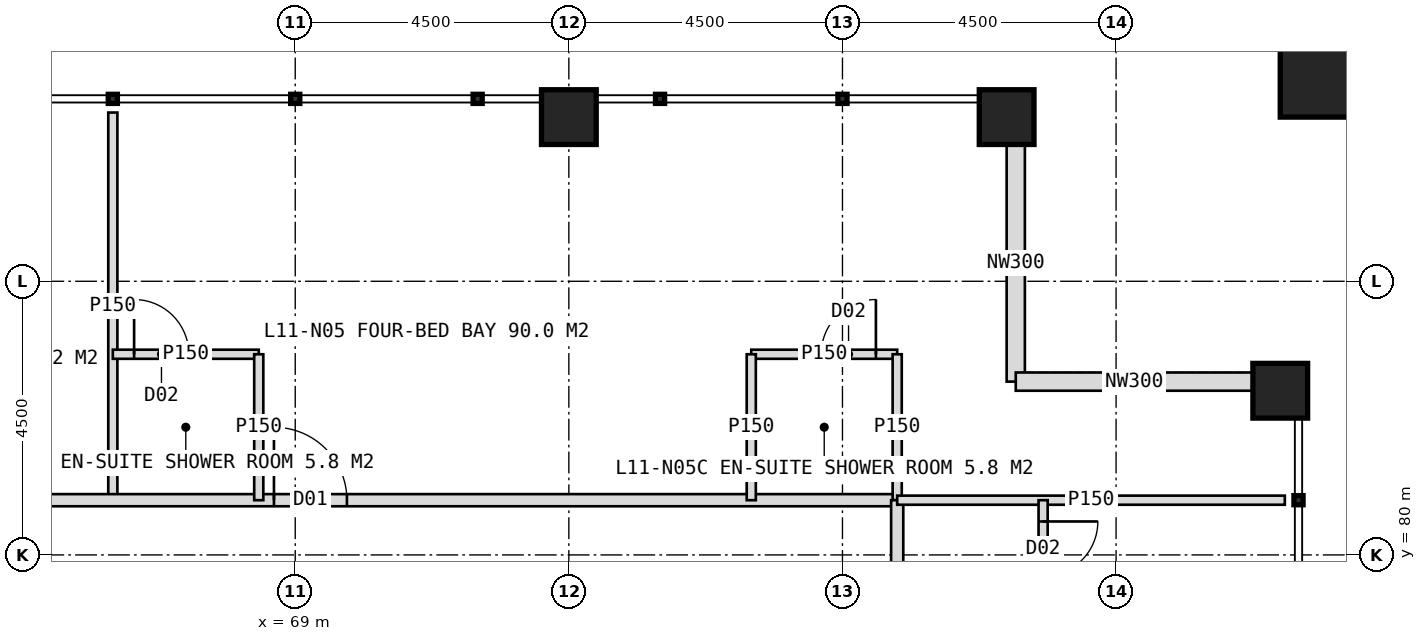
"""IFC4 building model, lengths in metres.
Left out: names, types, materials, properties, quantities, classifications, styles, units other than length and angle.
Written with IfcOpenShell. Run it as: python <this file> out.ifc"""

import sys

from ifc_helpers import new_model, si_unit, direction, frame, frame_2d, origin, origin_2d, place, context, subcontext, project, spatial, rectangle, hollow_rectangle, extrude, element, fill, save


model = new_model("IFC4")
c1 = context("Model", 3, precision=1e-05, world=origin(), true_north=direction((0.0, 1.0)))
c2 = subcontext(c1, "Body", "Model", "MODEL_VIEW")
j1 = project(units=[si_unit("LENGTHUNIT", "METRE"), si_unit("PLANEANGLEUNIT", "RADIAN")], contexts=[c1])
p1 = place(None, origin())
s1 = spatial("IfcSite", under=j1, at=p1, CompositionType="ELEMENT")
p2 = place(p1, origin())
s2 = spatial("IfcBuilding", under=s1, at=p2, CompositionType="ELEMENT")
p3 = place(p2, frame((0.0, 0.0, 51.0)))
s3 = spatial("IfcBuildingStorey", under=s2, at=p3, CompositionType="ELEMENT", Elevation=51.0)
for number, where, z_axis, x_axis in (
    (1, (73.5, 87.2, 0.0), (0.0, 0.0, 1.0), (1.0, 0.0, 0.0)),
    (2, (80.7, 87.2, 0.0), (0.0, 0.0, 1.0), (1.0, 0.0, 0.0)),
    (3, (85.2, 82.7, 0.0), (0.0, 0.0, 1.0), (1.0, 0.0, 0.0)),
):
    element("IfcColumn", number, at=place(p3, frame(where, z_axis=z_axis, x_axis=x_axis)), inside=s3, PredefinedType="COLUMN", context=c2, shape_type="SweptSolid", body=[
        extrude(hollow_rectangle(XDim=0.9, YDim=0.9, WallThickness=0.08, at=origin_2d()), origin(), (0.0, 0.0, 1.0), 4.0),
    ])
p4 = place(p3, frame((86.1, 88.1, 0.0), z_axis=(0.0, 0.0, 1.0), x_axis=(1.0, 0.0, 0.0)))
e4 = element("IfcColumn", 4, at=p4, inside=s3, PredefinedType="COLUMN", context=c2, shape_type="SweptSolid", body=[
    extrude(hollow_rectangle(XDim=1.8, YDim=1.8, WallThickness=0.1, at=origin_2d()), origin(), (0.0, 0.0, 1.0), 4.0),
])
for number, where, z_axis, x_axis in (
    (5, (80.85, 86.75, 0.0), (0.0, 0.0, 1.0), (0.0, -1.0, 0.0)),
    (6, (80.85, 82.85, 0.0), (0.0, 0.0, 1.0), (1.0, 0.0, 0.0)),
):
    element("IfcWall", number, at=place(p3, frame(where, z_axis=z_axis, x_axis=x_axis)), inside=s3, PredefinedType="ELEMENTEDWALL", context=c2, shape_type="SweptSolid", body=[
        extrude(rectangle(XDim=3.9, YDim=0.3, at=frame_2d((1.95, 0.0))), origin(), (0.0, 0.0, 1.0), 2.95),
    ])
p5 = place(p3, frame((66.0, 80.9, 0.0), z_axis=(0.0, 0.0, 1.0), x_axis=(0.0, 1.0, 0.0)))
e7 = element("IfcWall", 7, at=p5, inside=s3, PredefinedType="PARTITIONING", context=c2, shape_type="SweptSolid", body=[
    extrude(rectangle(XDim=6.375, YDim=0.15, at=frame_2d((3.188, 0.0))), origin(), (0.0, 0.0, 1.0), 3.75),
])
p6 = place(p3, frame((41.1, 80.9, 0.0), z_axis=(0.0, 0.0, 1.0), x_axis=(1.0, 0.0, 0.0)))
e8 = element("IfcWall", 8, at=p6, inside=s3, PredefinedType="PARTITIONING", context=c2, shape_type="SweptSolid", body=[
    extrude(rectangle(XDim=37.8, YDim=0.2, at=frame_2d((18.9, 0.0))), origin(), (0.0, 0.0, 1.0), 3.75),
])
p7 = place(p6, frame((3.25, 0.0, 0.0)))
e9 = element("IfcOpeningElement", 9, at=p7, cuts=e8, PredefinedType="OPENING", context=c2, shape_type="SweptSolid", body=[
    extrude(rectangle(XDim=1.2, YDim=2.2, at=frame_2d((0.6, 1.1))), frame((0.0, 0.11, 0.0), z_axis=(0.0, -1.0, 0.0), x_axis=(1.0, 0.0, 0.0)), (0.0, 0.0, 1.0), 0.22),
])
p8 = place(p6, frame((9.55, 0.0, 0.0)))
e10 = element("IfcOpeningElement", 10, at=p8, cuts=e8, PredefinedType="OPENING", context=c2, shape_type="SweptSolid", body=[
    extrude(rectangle(XDim=1.2, YDim=2.2, at=frame_2d((0.6, 1.1))), frame((0.0, 0.11, 0.0), z_axis=(0.0, -1.0, 0.0), x_axis=(1.0, 0.0, 0.0)), (0.0, 0.0, 1.0), 0.22),
])
p9 = place(p6, frame((15.55, 0.0, 0.0)))
e11 = element("IfcOpeningElement", 11, at=p9, cuts=e8, PredefinedType="OPENING", context=c2, shape_type="SweptSolid", body=[
    extrude(rectangle(XDim=1.2, YDim=2.2, at=frame_2d((0.6, 1.1))), frame((0.0, 0.11, 0.0), z_axis=(0.0, -1.0, 0.0), x_axis=(1.0, 0.0, 0.0)), (0.0, 0.0, 1.0), 0.22),
])
p10 = place(p6, frame((21.4, 0.0, 0.0)))
e12 = element("IfcOpeningElement", 12, at=p10, cuts=e8, PredefinedType="OPENING", context=c2, shape_type="SweptSolid", body=[
    extrude(rectangle(XDim=1.0, YDim=2.1, at=frame_2d((0.5, 1.05))), frame((0.0, 0.11, 0.0), z_axis=(0.0, -1.0, 0.0), x_axis=(1.0, 0.0, 0.0)), (0.0, 0.0, 1.0), 0.22),
])
p11 = place(p6, frame((27.55, 0.0, 0.0)))
e13 = element("IfcOpeningElement", 13, at=p11, cuts=e8, PredefinedType="OPENING", context=c2, shape_type="SweptSolid", body=[
    extrude(rectangle(XDim=1.2, YDim=2.2, at=frame_2d((0.6, 1.1))), frame((0.0, 0.11, 0.0), z_axis=(0.0, -1.0, 0.0), x_axis=(1.0, 0.0, 0.0)), (0.0, 0.0, 1.0), 0.22),
])
p12 = place(p3, frame((66.0, 83.3, 0.0), z_axis=(0.0, 0.0, 1.0), x_axis=(1.0, 0.0, 0.0)))
e14 = element("IfcWall", 14, at=p12, inside=s3, PredefinedType="PARTITIONING", context=c2, shape_type="SweptSolid", body=[
    extrude(rectangle(XDim=2.4, YDim=0.15, at=frame_2d((1.2, 0.0))), origin(), (0.0, 0.0, 1.0), 3.75),
])
p13 = place(p12, frame((0.35, 0.0, 0.0)))
e15 = element("IfcOpeningElement", 15, at=p13, cuts=e14, PredefinedType="OPENING", context=c2, shape_type="SweptSolid", body=[
    extrude(rectangle(XDim=0.9, YDim=2.1, at=frame_2d((0.45, 1.05))), frame((0.0, 0.085, 0.0), z_axis=(0.0, -1.0, 0.0), x_axis=(1.0, 0.0, 0.0)), (0.0, 0.0, 1.0), 0.17),
])
p14 = place(p3, frame((68.4, 80.9, 0.0), z_axis=(0.0, 0.0, 1.0), x_axis=(0.0, 1.0, 0.0)))
e16 = element("IfcWall", 16, at=p14, inside=s3, PredefinedType="PARTITIONING", context=c2, shape_type="SweptSolid", body=[
    extrude(rectangle(XDim=2.4, YDim=0.15, at=frame_2d((1.2, 0.0))), origin(), (0.0, 0.0, 1.0), 3.75),
])
p15 = place(p3, frame((76.5, 83.3, 0.0), z_axis=(0.0, 0.0, 1.0), x_axis=(1.0, 0.0, 0.0)))
e17 = element("IfcWall", 17, at=p15, inside=s3, PredefinedType="PARTITIONING", context=c2, shape_type="SweptSolid", body=[
    extrude(rectangle(XDim=2.4, YDim=0.15, at=frame_2d((1.2, 0.0))), origin(), (0.0, 0.0, 1.0), 3.75),
])
p16 = place(p15, frame((1.15, 0.0, 0.0)))
e18 = element("IfcOpeningElement", 18, at=p16, cuts=e17, PredefinedType="OPENING", context=c2, shape_type="SweptSolid", body=[
    extrude(rectangle(XDim=0.9, YDim=2.1, at=frame_2d((0.45, 1.05))), frame((0.0, 0.085, 0.0), z_axis=(0.0, -1.0, 0.0), x_axis=(1.0, 0.0, 0.0)), (0.0, 0.0, 1.0), 0.17),
])
for number, where, z_axis, x_axis in (
    (19, (76.5, 80.9, 0.0), (0.0, 0.0, 1.0), (0.0, 1.0, 0.0)),
    (20, (78.9, 80.9, 0.0), (0.0, 0.0, 1.0), (0.0, 1.0, 0.0)),
):
    element("IfcWall", number, at=place(p3, frame(where, z_axis=z_axis, x_axis=x_axis)), inside=s3, PredefinedType="PARTITIONING", context=c2, shape_type="SweptSolid", body=[
        extrude(rectangle(XDim=2.4, YDim=0.15, at=frame_2d((1.2, 0.0))), origin(), (0.0, 0.0, 1.0), 3.75),
    ])
p17 = place(p3, frame((78.9, 80.9, 0.0), z_axis=(0.0, 0.0, 1.0), x_axis=(0.0, -1.0, 0.0)))
e21 = element("IfcWall", 21, at=p17, inside=s3, PredefinedType="PARTITIONING", context=c2, shape_type="SweptSolid", body=[
    extrude(rectangle(XDim=37.8, YDim=0.2, at=frame_2d((18.9, 0.0))), origin(), (0.0, 0.0, 1.0), 3.75),
])
p18 = place(p17, frame((3.25, 0.0, 0.0)))
e22 = element("IfcOpeningElement", 22, at=p18, cuts=e21, PredefinedType="OPENING", context=c2, shape_type="SweptSolid", body=[
    extrude(rectangle(XDim=1.2, YDim=2.2, at=frame_2d((0.6, 1.1))), frame((0.0, 0.11, 0.0), z_axis=(0.0, -1.0, 0.0), x_axis=(1.0, 0.0, 0.0)), (0.0, 0.0, 1.0), 0.22),
])
p19 = place(p17, frame((9.55, 0.0, 0.0)))
e23 = element("IfcOpeningElement", 23, at=p19, cuts=e21, PredefinedType="OPENING", context=c2, shape_type="SweptSolid", body=[
    extrude(rectangle(XDim=1.2, YDim=2.2, at=frame_2d((0.6, 1.1))), frame((0.0, 0.11, 0.0), z_axis=(0.0, -1.0, 0.0), x_axis=(1.0, 0.0, 0.0)), (0.0, 0.0, 1.0), 0.22),
])
p20 = place(p17, frame((15.55, 0.0, 0.0)))
e24 = element("IfcOpeningElement", 24, at=p20, cuts=e21, PredefinedType="OPENING", context=c2, shape_type="SweptSolid", body=[
    extrude(rectangle(XDim=1.2, YDim=2.2, at=frame_2d((0.6, 1.1))), frame((0.0, 0.11, 0.0), z_axis=(0.0, -1.0, 0.0), x_axis=(1.0, 0.0, 0.0)), (0.0, 0.0, 1.0), 0.22),
])
p21 = place(p17, frame((21.55, 0.0, 0.0)))
e25 = element("IfcOpeningElement", 25, at=p21, cuts=e21, PredefinedType="OPENING", context=c2, shape_type="SweptSolid", body=[
    extrude(rectangle(XDim=1.2, YDim=2.2, at=frame_2d((0.6, 1.1))), frame((0.0, 0.11, 0.0), z_axis=(0.0, -1.0, 0.0), x_axis=(1.0, 0.0, 0.0)), (0.0, 0.0, 1.0), 0.22),
])
p22 = place(p17, frame((30.55, 0.0, 0.0)))
e26 = element("IfcOpeningElement", 26, at=p22, cuts=e21, PredefinedType="OPENING", context=c2, shape_type="SweptSolid", body=[
    extrude(rectangle(XDim=1.2, YDim=2.2, at=frame_2d((0.6, 1.1))), frame((0.0, 0.11, 0.0), z_axis=(0.0, -1.0, 0.0), x_axis=(1.0, 0.0, 0.0)), (0.0, 0.0, 1.0), 0.22),
])
p23 = place(p3, frame((78.9, 80.9, 0.0), z_axis=(0.0, 0.0, 1.0), x_axis=(1.0, 0.0, 0.0)))
e27 = element("IfcWall", 27, at=p23, inside=s3, PredefinedType="PARTITIONING", context=c2, shape_type="SweptSolid", body=[
    extrude(rectangle(XDim=6.375, YDim=0.15, at=frame_2d((3.188, 0.0))), origin(), (0.0, 0.0, 1.0), 3.75),
])
p24 = place(p3, frame((81.3, 80.9, 0.0), z_axis=(0.0, 0.0, 1.0), x_axis=(0.0, -1.0, 0.0)))
e28 = element("IfcWall", 28, at=p24, inside=s3, PredefinedType="PARTITIONING", context=c2, shape_type="SweptSolid", body=[
    extrude(rectangle(XDim=3.0, YDim=0.15, at=frame_2d((1.5, 0.0))), origin(), (0.0, 0.0, 1.0), 3.75),
])
p25 = place(p24, frame((0.35, 0.0, 0.0)))
e29 = element("IfcOpeningElement", 29, at=p25, cuts=e28, PredefinedType="OPENING", context=c2, shape_type="SweptSolid", body=[
    extrude(rectangle(XDim=0.9, YDim=2.1, at=frame_2d((0.45, 1.05))), frame((0.0, 0.085, 0.0), z_axis=(0.0, -1.0, 0.0), x_axis=(1.0, 0.0, 0.0)), (0.0, 0.0, 1.0), 0.17),
])
p26 = place(p11, origin())
e30 = element("IfcDoor", 30, at=p26, inside=s3, OperationType="SINGLE_SWING_LEFT", PredefinedType="DOOR", context=c2, shape_type="SweptSolid", body=[
    extrude(rectangle(XDim=1.2, YDim=2.2, at=frame_2d((0.6, 1.1))), frame((0.0, 0.025, 0.0), z_axis=(0.0, -1.0, 0.0), x_axis=(1.0, 0.0, 0.0)), (0.0, 0.0, 1.0), 0.05),
])
fill(e13, e30)
p27 = place(p13, origin())
e31 = element("IfcDoor", 31, at=p27, inside=s3, OperationType="SINGLE_SWING_LEFT", PredefinedType="DOOR", context=c2, shape_type="SweptSolid", body=[
    extrude(rectangle(XDim=0.9, YDim=2.1, at=frame_2d((0.45, 1.05))), frame((0.0, 0.025, 0.0), z_axis=(0.0, -1.0, 0.0), x_axis=(1.0, 0.0, 0.0)), (0.0, 0.0, 1.0), 0.05),
])
fill(e15, e31)
p28 = place(p16, origin())
e32 = element("IfcDoor", 32, at=p28, inside=s3, OperationType="SINGLE_SWING_RIGHT", PredefinedType="DOOR", context=c2, shape_type="SweptSolid", body=[
    extrude(rectangle(XDim=0.9, YDim=2.1, at=frame_2d((0.45, 1.05))), frame((0.0, 0.025, 0.0), z_axis=(0.0, -1.0, 0.0), x_axis=(1.0, 0.0, 0.0)), (0.0, 0.0, 1.0), 0.05),
])
fill(e18, e32)
p29 = place(p25, origin())
e33 = element("IfcDoor", 33, at=p29, inside=s3, OperationType="SINGLE_SWING_LEFT", PredefinedType="DOOR", context=c2, shape_type="SweptSolid", body=[
    extrude(rectangle(XDim=0.9, YDim=2.1, at=frame_2d((0.45, 1.05))), frame((0.0, 0.025, 0.0), z_axis=(0.0, -1.0, 0.0), x_axis=(1.0, 0.0, 0.0)), (0.0, 0.0, 1.0), 0.05),
])
fill(e29, e33)
save(model, sys.argv[1])
